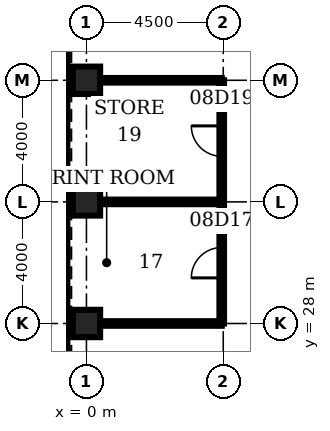
"""IFC4 building model, lengths in metres.
Left out: names, types, materials, properties, quantities, classifications, styles, units other than length and angle.
Written with IfcOpenShell. Run it as: python <this file> out.ifc"""

import sys

from ifc_helpers import new_model, si_unit, direction, frame, frame_2d, origin, origin_2d, place, context, subcontext, project, spatial, rectangle, hollow_rectangle, extrude, element, fill, save


model = new_model("IFC4")
c1 = context("Model", 3, precision=1e-05, world=origin(), true_north=direction((0.0, 1.0)))
c2 = subcontext(c1, "Body", "Model", "MODEL_VIEW")
j1 = project(units=[si_unit("LENGTHUNIT", "METRE"), si_unit("PLANEANGLEUNIT", "RADIAN")], contexts=[c1])
p1 = place(None, origin())
s1 = spatial("IfcSite", under=j1, at=p1, CompositionType="ELEMENT")
p2 = place(p1, origin())
s2 = spatial("IfcBuilding", under=s1, at=p2, CompositionType="ELEMENT")
p3 = place(p2, frame((0.0, 0.0, 41.0)))
s3 = spatial("IfcBuildingStorey", under=s2, at=p3, CompositionType="ELEMENT", Elevation=41.0)
for number, where, z_axis, x_axis in (
    (1, (0.0, 36.0, 0.0), (0.0, 0.0, 1.0), (1.0, 0.0, 0.0)),
    (2, (0.0, 32.0, 0.0), (0.0, 0.0, 1.0), (1.0, 0.0, 0.0)),
    (3, (0.0, 28.0, 0.0), (0.0, 0.0, 1.0), (1.0, 0.0, 0.0)),
):
    element("IfcColumn", number, at=place(p3, frame(where, z_axis=z_axis, x_axis=x_axis)), inside=s3, PredefinedType="COLUMN", context=c2, shape_type="SweptSolid", body=[
        extrude(hollow_rectangle(XDim=0.9, YDim=0.9, WallThickness=0.12, at=origin_2d()), origin(), (0.0, 0.0, 1.0), 4.5),
    ])
for number, where, z_axis, x_axis in (
    (4, (0.45, 28.0, 0.0), (0.0, 0.0, 1.0), (1.0, 0.0, 0.0)),
    (5, (0.45, 32.0, 0.0), (0.0, 0.0, 1.0), (1.0, 0.0, 0.0)),
    (6, (0.45, 36.0, 0.0), (0.0, 0.0, 1.0), (1.0, 0.0, 0.0)),
):
    element("IfcWall", number, at=place(p3, frame(where, z_axis=z_axis, x_axis=x_axis)), inside=s3, PredefinedType="PARTITIONING", context=c2, shape_type="SweptSolid", body=[
        extrude(rectangle(XDim=4.0, YDim=0.15, at=frame_2d((2.0, 0.0))), origin(), (0.0, 0.0, 1.0), 3.0),
    ])
p4 = place(p3, frame((4.45, 28.0, 0.0), z_axis=(0.0, 0.0, 1.0), x_axis=(0.0, 1.0, 0.0)))
e7 = element("IfcWall", 7, at=p4, inside=s3, PredefinedType="PARTITIONING", context=c2, shape_type="SweptSolid", body=[
    extrude(rectangle(XDim=8.0, YDim=0.15, at=frame_2d((4.0, 0.0))), origin(), (0.0, 0.0, 1.0), 3.0),
])
p5 = place(p4, frame((1.5, 0.0, 0.0)))
e8 = element("IfcOpeningElement", 8, at=p5, cuts=e7, PredefinedType="OPENING", context=c2, shape_type="SweptSolid", body=[
    extrude(rectangle(XDim=1.0, YDim=2.1, at=frame_2d((0.5, 1.05))), frame((0.0, 0.085, 0.0), z_axis=(0.0, -1.0, 0.0), x_axis=(1.0, 0.0, 0.0)), (0.0, 0.0, 1.0), 0.17),
])
p6 = place(p4, frame((5.5, 0.0, 0.0)))
e9 = element("IfcOpeningElement", 9, at=p6, cuts=e7, PredefinedType="OPENING", context=c2, shape_type="SweptSolid", body=[
    extrude(rectangle(XDim=1.0, YDim=2.1, at=frame_2d((0.5, 1.05))), frame((0.0, 0.085, 0.0), z_axis=(0.0, -1.0, 0.0), x_axis=(1.0, 0.0, 0.0)), (0.0, 0.0, 1.0), 0.17),
])
p7 = place(p5, origin())
e10 = element("IfcDoor", 10, at=p7, inside=s3, OperationType="SINGLE_SWING_LEFT", PredefinedType="DOOR", context=c2, shape_type="SweptSolid", body=[
    extrude(rectangle(XDim=1.0, YDim=2.1, at=frame_2d((0.5, 1.05))), frame((0.0, 0.025, 0.0), z_axis=(0.0, -1.0, 0.0), x_axis=(1.0, 0.0, 0.0)), (0.0, 0.0, 1.0), 0.05),
])
fill(e8, e10)
p8 = place(p6, origin())
e11 = element("IfcDoor", 11, at=p8, inside=s3, OperationType="SINGLE_SWING_RIGHT", PredefinedType="DOOR", context=c2, shape_type="SweptSolid", body=[
    extrude(rectangle(XDim=1.0, YDim=2.1, at=frame_2d((0.5, 1.05))), frame((0.0, 0.025, 0.0), z_axis=(0.0, -1.0, 0.0), x_axis=(1.0, 0.0, 0.0)), (0.0, 0.0, 1.0), 0.05),
])
fill(e9, e11)
save(model, sys.argv[1])
